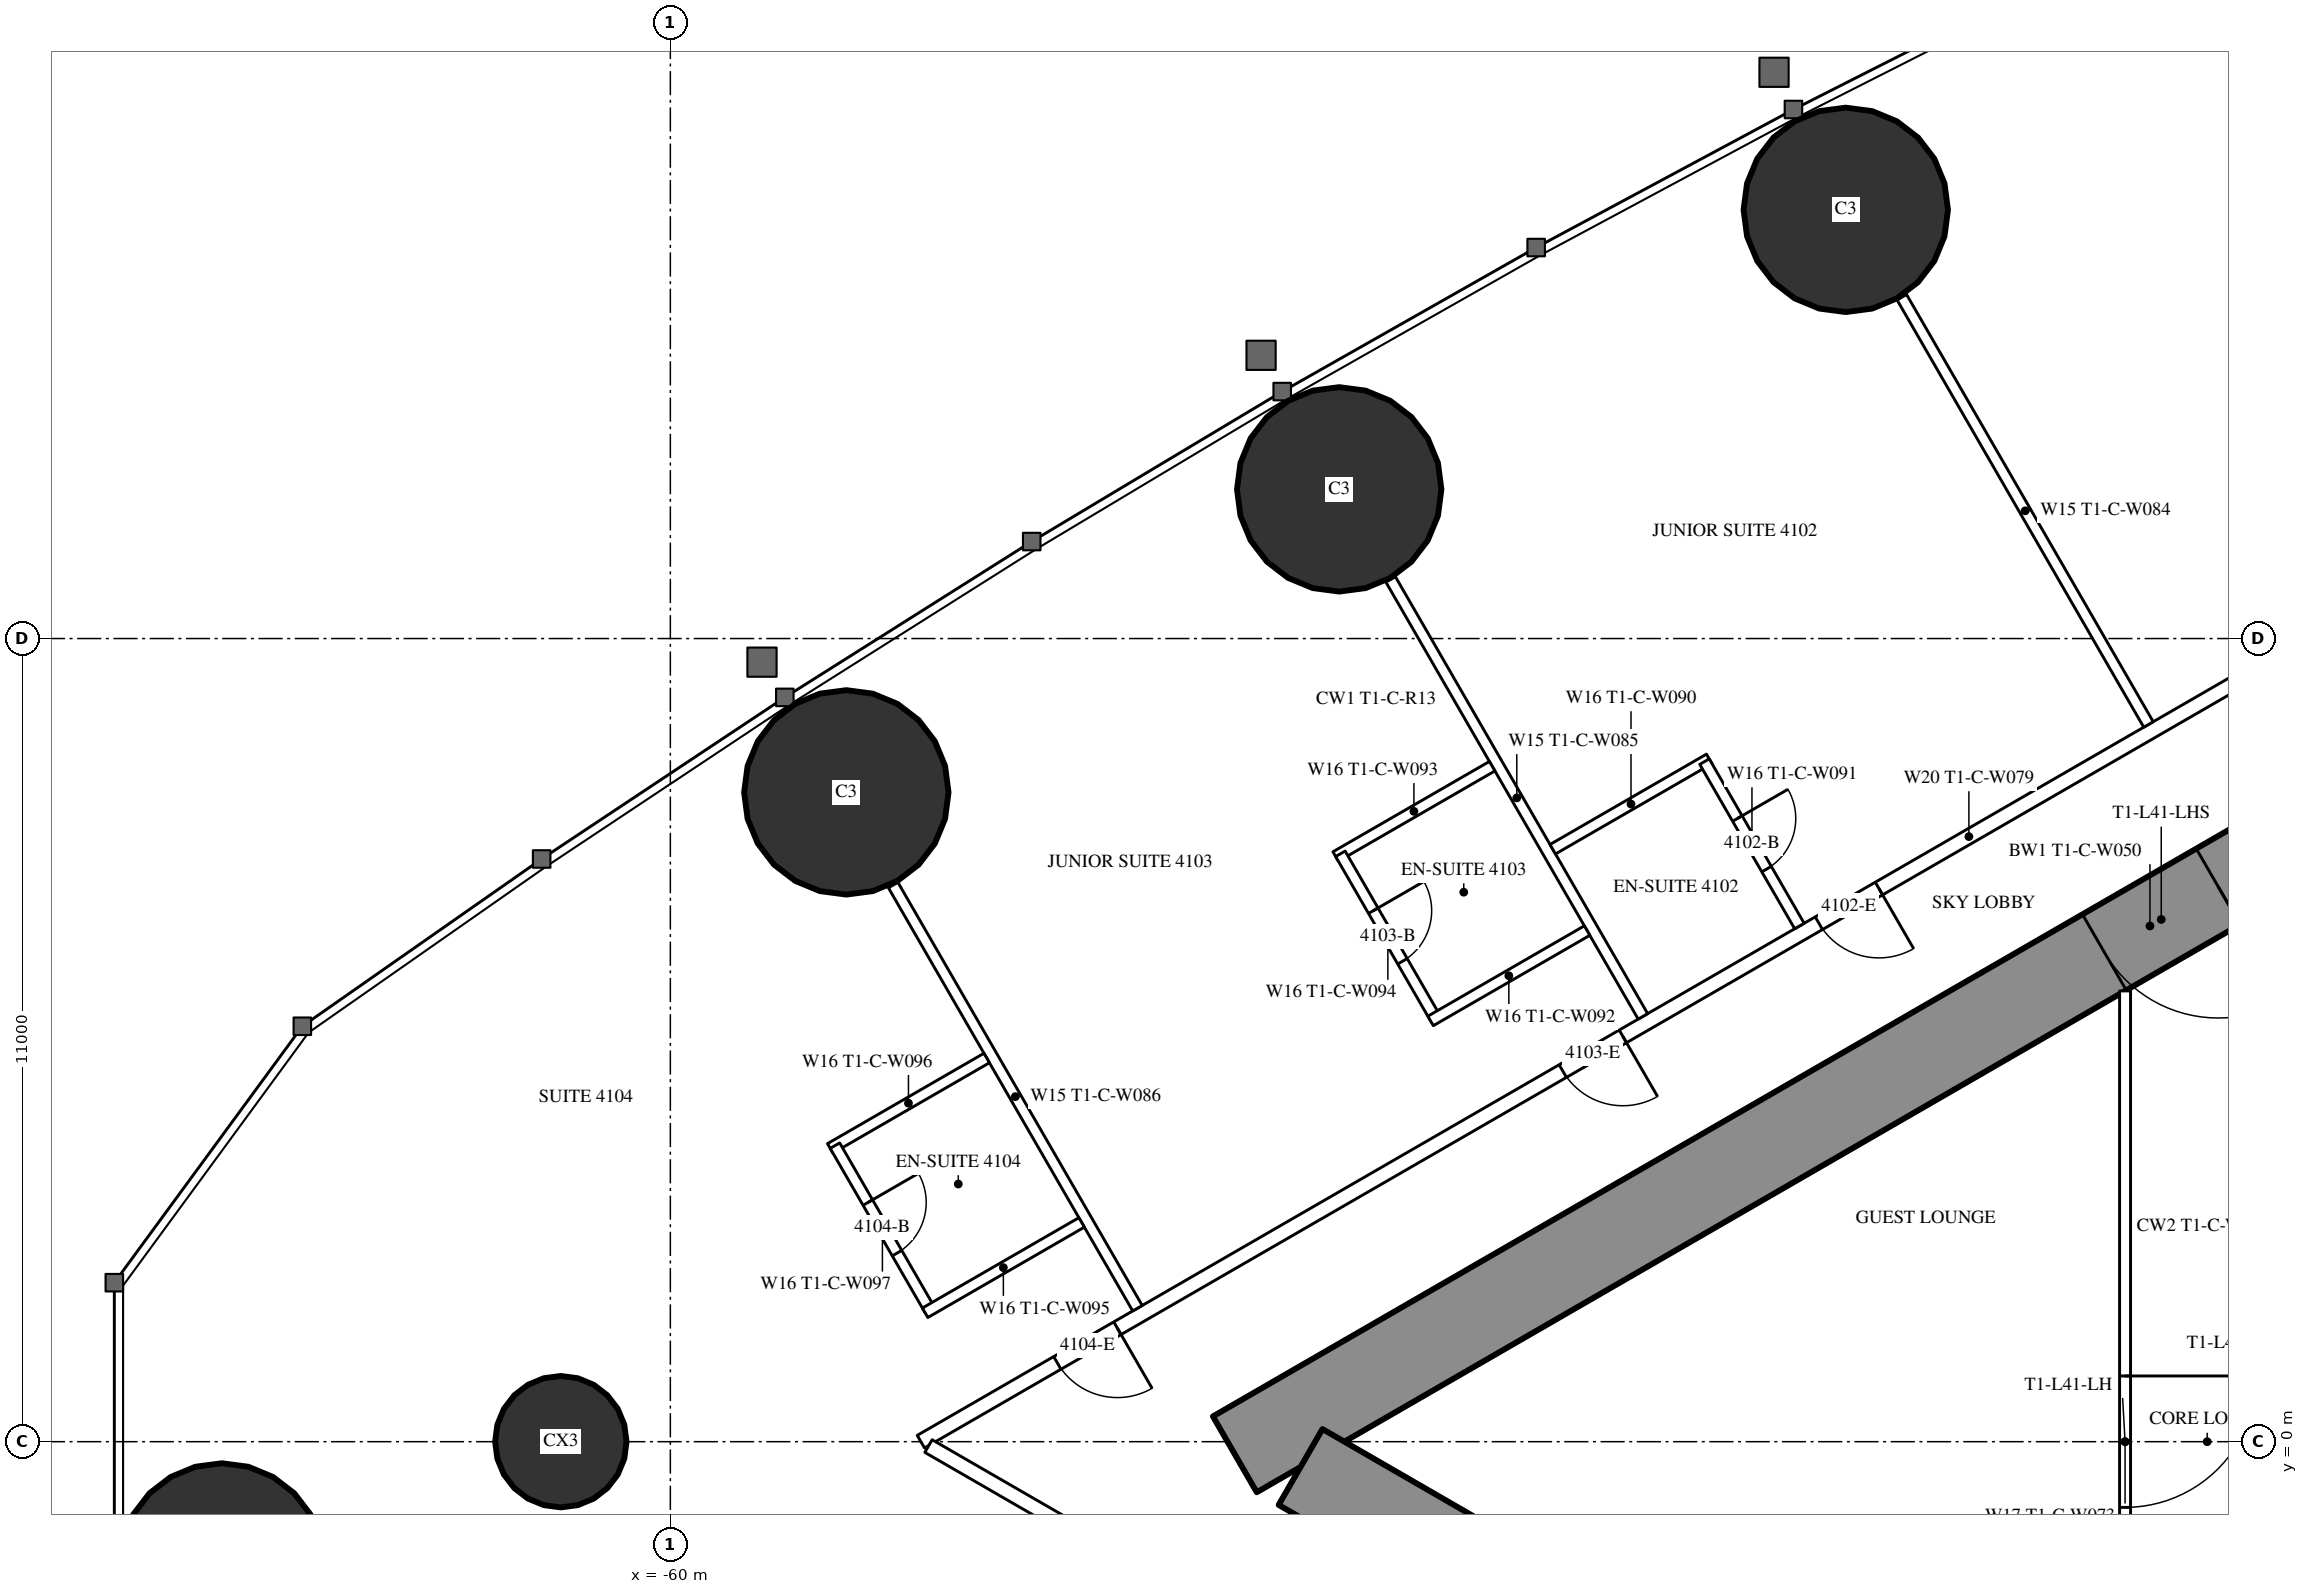
"""IFC4 building model, lengths in metres.
Left out: names, types, materials, properties, quantities, classifications, styles, units other than length and angle.
Written with IfcOpenShell. Run it as: python <this file> out.ifc"""

import sys

from ifc_helpers import new_model, si_unit, direction, frame, frame_2d, origin, origin_2d, place, context, subcontext, project, spatial, rectangle, circle, extrude, element, fill, save


model = new_model("IFC4")
c1 = context("Model", 3, precision=1e-05, world=origin(), true_north=direction((0.0, 1.0)))
c2 = subcontext(c1, "Body", "Model", "MODEL_VIEW")
j1 = project(units=[si_unit("LENGTHUNIT", "METRE"), si_unit("PLANEANGLEUNIT", "RADIAN")], contexts=[c1])
p1 = place(None, origin())
s1 = spatial("IfcSite", under=j1, at=p1, CompositionType="ELEMENT")
p2 = place(p1, origin())
s2 = spatial("IfcBuilding", under=s1, at=p2, CompositionType="ELEMENT")
p3 = place(p2, frame((0.0, 0.0, 156.3)))
s3 = spatial("IfcBuildingStorey", under=s2, at=p3, CompositionType="ELEMENT", Elevation=156.3)
for number, where, z_axis, x_axis in (
    (1, (-66.143, -1.695, 0.0), (0.0, 0.0, 1.0), (1.0, 0.0, 0.0)),
    (2, (-43.9, 16.871, 0.0), (0.0, 0.0, 1.0), (1.0, 0.0, 0.0)),
    (3, (-50.839, 13.043, 0.0), (0.0, 0.0, 1.0), (1.0, 0.0, 0.0)),
    (4, (-57.59, 8.893, 0.0), (0.0, 0.0, 1.0), (1.0, 0.0, 0.0)),
):
    element("IfcColumn", number, at=place(p3, frame(where, z_axis=z_axis, x_axis=x_axis)), inside=s3, PredefinedType="COLUMN", context=c2, shape_type="SweptSolid", body=[
        extrude(circle(Radius=1.4, at=origin_2d()), origin(), (0.0, 0.0, 1.0), 3.5),
    ])
p4 = place(p3, frame((-61.5, 0.0, 0.0), z_axis=(0.0, 0.0, 1.0), x_axis=(1.0, 0.0, 0.0)))
e5 = element("IfcColumn", 5, at=p4, inside=s3, PredefinedType="COLUMN", context=c2, shape_type="SweptSolid", body=[
    extrude(circle(Radius=0.9, at=origin_2d()), origin(), (0.0, 0.0, 1.0), 3.5),
])
p5 = place(p3, frame((-27.2, 14.3, 0.0), z_axis=(0.0, 0.0, 1.0), x_axis=(-0.866026593062, -0.499997940104, 0.0)))
e6 = element("IfcWall", 6, at=p5, inside=s3, PredefinedType="SHEAR", context=c2, shape_type="SweptSolid", body=[
    extrude(rectangle(XDim=28.946, YDim=1.2, at=frame_2d((14.473, 0.0))), origin(), (0.0, 0.0, 1.0), 3.5),
])
p6 = place(p5, frame((4.6, 0.0, 0.0)))
e7 = element("IfcOpeningElement", 7, at=p6, cuts=e6, PredefinedType="OPENING", context=c2, shape_type="SweptSolid", body=[
    extrude(rectangle(XDim=1.0, YDim=2.2, at=frame_2d((0.5, 1.1))), frame((0.0, 0.61, 0.0), z_axis=(0.0, -1.0, 0.0), x_axis=(1.0, 0.0, 0.0)), (0.0, 0.0, 1.0), 1.22),
])
p7 = place(p5, frame((13.395, 0.0, 0.0)))
e8 = element("IfcOpeningElement", 8, at=p7, cuts=e6, PredefinedType="OPENING", context=c2, shape_type="SweptSolid", body=[
    extrude(rectangle(XDim=1.8, YDim=2.2, at=frame_2d((0.9, 1.1))), frame((0.0, 0.61, 0.0), z_axis=(0.0, -1.0, 0.0), x_axis=(1.0, 0.0, 0.0)), (0.0, 0.0, 1.0), 1.22),
])
p8 = place(p3, frame((-27.2, -14.3, 0.0), z_axis=(0.0, 0.0, 1.0), x_axis=(-0.866024021859, 0.500002393557, 0.0)))
e9 = element("IfcWall", 9, at=p8, inside=s3, PredefinedType="SHEAR", context=c2, shape_type="SweptSolid", body=[
    extrude(rectangle(XDim=27.907, YDim=1.2, at=frame_2d((13.954, 0.0))), origin(), (0.0, 0.0, 1.0), 3.5),
])
p9 = place(p8, frame((4.6, 0.0, 0.0)))
e10 = element("IfcOpeningElement", 10, at=p9, cuts=e9, PredefinedType="OPENING", context=c2, shape_type="SweptSolid", body=[
    extrude(rectangle(XDim=1.0, YDim=2.2, at=frame_2d((0.5, 1.1))), frame((0.0, 0.61, 0.0), z_axis=(0.0, -1.0, 0.0), x_axis=(1.0, 0.0, 0.0)), (0.0, 0.0, 1.0), 1.22),
])
p10 = place(p8, frame((13.395, 0.0, 0.0)))
e11 = element("IfcOpeningElement", 11, at=p10, cuts=e9, PredefinedType="OPENING", context=c2, shape_type="SweptSolid", body=[
    extrude(rectangle(XDim=1.8, YDim=2.2, at=frame_2d((0.9, 1.1))), frame((0.0, 0.61, 0.0), z_axis=(0.0, -1.0, 0.0), x_axis=(1.0, 0.0, 0.0)), (0.0, 0.0, 1.0), 1.22),
])
p11 = place(p3, frame((-27.86, 16.575, 0.0), z_axis=(0.0, 0.0, 1.0), x_axis=(-0.866025533911, -0.499999774615, 0.0)))
e12 = element("IfcWall", 12, at=p11, inside=s3, PredefinedType="PARTITIONING", context=c2, shape_type="SweptSolid", body=[
    extrude(rectangle(XDim=33.149, YDim=0.2, at=frame_2d((16.575, 0.0))), origin(), (0.0, 0.0, 1.0), 3.25),
])
p12 = place(p11, frame((3.75, 0.0, 0.0)))
e13 = element("IfcOpeningElement", 13, at=p12, cuts=e12, PredefinedType="OPENING", context=c2, shape_type="SweptSolid", body=[
    extrude(rectangle(XDim=1.0, YDim=2.2, at=frame_2d((0.5, 1.1))), frame((0.0, 0.11, 0.0), z_axis=(0.0, -1.0, 0.0), x_axis=(1.0, 0.0, 0.0)), (0.0, 0.0, 1.0), 0.22),
])
p13 = place(p11, frame((17.997, 0.0, 0.0)))
e14 = element("IfcOpeningElement", 14, at=p13, cuts=e12, PredefinedType="OPENING", context=c2, shape_type="SweptSolid", body=[
    extrude(rectangle(XDim=0.95, YDim=2.2, at=frame_2d((0.475, 1.1))), frame((0.0, 0.11, 0.0), z_axis=(0.0, -1.0, 0.0), x_axis=(1.0, 0.0, 0.0)), (0.0, 0.0, 1.0), 0.22),
])
p14 = place(p11, frame((22.047, 0.0, 0.0)))
e15 = element("IfcOpeningElement", 15, at=p14, cuts=e12, PredefinedType="OPENING", context=c2, shape_type="SweptSolid", body=[
    extrude(rectangle(XDim=0.95, YDim=2.2, at=frame_2d((0.475, 1.1))), frame((0.0, 0.11, 0.0), z_axis=(0.0, -1.0, 0.0), x_axis=(1.0, 0.0, 0.0)), (0.0, 0.0, 1.0), 0.22),
])
p15 = place(p11, frame((30.042, 0.0, 0.0)))
e16 = element("IfcOpeningElement", 16, at=p15, cuts=e12, PredefinedType="OPENING", context=c2, shape_type="SweptSolid", body=[
    extrude(rectangle(XDim=0.95, YDim=2.2, at=frame_2d((0.475, 1.1))), frame((0.0, 0.11, 0.0), z_axis=(0.0, -1.0, 0.0), x_axis=(1.0, 0.0, 0.0)), (0.0, 0.0, 1.0), 0.22),
])
p16 = place(p3, frame((-39.754, 9.823, 0.0), z_axis=(0.0, 0.0, 1.0), x_axis=(-0.499997670926, 0.866026748472, 0.0)))
e17 = element("IfcWall", 17, at=p16, inside=s3, PredefinedType="PARTITIONING", context=c2, shape_type="SweptSolid", body=[
    extrude(rectangle(XDim=6.757, YDim=0.15, at=frame_2d((3.379, 0.0))), origin(), (0.0, 0.0, 1.0), 2.3),
])
p17 = place(p3, frame((-46.679, 5.825, 0.0), z_axis=(0.0, 0.0, 1.0), x_axis=(-0.500006839597, 0.866021454905, 0.0)))
e18 = element("IfcWall", 18, at=p17, inside=s3, PredefinedType="PARTITIONING", context=c2, shape_type="SweptSolid", body=[
    extrude(rectangle(XDim=6.911, YDim=0.15, at=frame_2d((3.456, 0.0))), origin(), (0.0, 0.0, 1.0), 2.3),
])
p18 = place(p3, frame((-53.602, 1.828, 0.0), z_axis=(0.0, 0.0, 1.0), x_axis=(-0.49999191814, 0.866030069798, 0.0)))
e19 = element("IfcWall", 19, at=p18, inside=s3, PredefinedType="PARTITIONING", context=c2, shape_type="SweptSolid", body=[
    extrude(rectangle(XDim=6.692, YDim=0.15, at=frame_2d((3.346, 0.0))), origin(), (0.0, 0.0, 1.0), 2.3),
])
p19 = place(p3, frame((-44.715, -6.844, 0.0), z_axis=(0.0, 0.0, 1.0), x_axis=(-0.866025261224, 0.500000246922, 0.0)))
e20 = element("IfcWall", 20, at=p19, inside=s3, PredefinedType="PARTITIONING", context=c2, shape_type="SweptSolid", body=[
    extrude(rectangle(XDim=13.567, YDim=0.2, at=frame_2d((6.783, 0.0))), origin(), (0.0, 0.0, 1.0), 3.25),
])
p20 = place(p19, frame((10.579, 0.0, 0.0)))
e21 = element("IfcOpeningElement", 21, at=p20, cuts=e20, PredefinedType="OPENING", context=c2, shape_type="SweptSolid", body=[
    extrude(rectangle(XDim=0.95, YDim=2.2, at=frame_2d((0.475, 1.1))), frame((0.0, 0.11, 0.0), z_axis=(0.0, -1.0, 0.0), x_axis=(1.0, 0.0, 0.0)), (0.0, 0.0, 1.0), 0.22),
])
p21 = place(p19, frame((6.529, 0.0, 0.0)))
e22 = element("IfcOpeningElement", 22, at=p21, cuts=e20, PredefinedType="OPENING", context=c2, shape_type="SweptSolid", body=[
    extrude(rectangle(XDim=0.95, YDim=2.2, at=frame_2d((0.475, 1.1))), frame((0.0, 0.11, 0.0), z_axis=(0.0, -1.0, 0.0), x_axis=(1.0, 0.0, 0.0)), (0.0, 0.0, 1.0), 0.22),
])
p22 = place(p19, frame((0.5, 0.0, 0.0)))
e23 = element("IfcOpeningElement", 23, at=p22, cuts=e20, PredefinedType="OPENING", context=c2, shape_type="SweptSolid", body=[
    extrude(rectangle(XDim=1.435, YDim=2.2, at=frame_2d((0.718, 1.1))), frame((0.0, 0.11, 0.0), z_axis=(0.0, -1.0, 0.0), x_axis=(1.0, 0.0, 0.0)), (0.0, 0.0, 1.0), 0.22),
])
p23 = place(p3, frame((-45.771, 9.352, 0.0), z_axis=(0.0, 0.0, 1.0), x_axis=(-0.866006523861, -0.500032699561, 0.0)))
e24 = element("IfcWall", 24, at=p23, inside=s3, PredefinedType="PARTITIONING", context=c2, shape_type="SweptSolid", body=[
    extrude(rectangle(XDim=2.475, YDim=0.15, at=frame_2d((1.237, 0.0))), origin(), (0.0, 0.0, 1.0), 3.25),
])
p24 = place(p3, frame((-44.535, 7.063, 0.0), z_axis=(0.0, 0.0, 1.0), x_axis=(-0.500047596559, 0.865997922154, 0.0)))
e25 = element("IfcWall", 25, at=p24, inside=s3, PredefinedType="PARTITIONING", context=c2, shape_type="SweptSolid", body=[
    extrude(rectangle(XDim=2.6, YDim=0.15, at=frame_2d((1.3, 0.0))), origin(), (0.0, 0.0, 1.0), 3.25),
])
p25 = place(p24, frame((0.9, 0.0, 0.0)))
e26 = element("IfcOpeningElement", 26, at=p25, cuts=e25, PredefinedType="OPENING", context=c2, shape_type="SweptSolid", body=[
    extrude(rectangle(XDim=0.8, YDim=2.2, at=frame_2d((0.4, 1.1))), frame((0.0, 0.085, 0.0), z_axis=(0.0, -1.0, 0.0), x_axis=(1.0, 0.0, 0.0)), (0.0, 0.0, 1.0), 0.17),
])
p26 = place(p3, frame((-48.744, 9.252, 0.0), z_axis=(0.0, 0.0, 1.0), x_axis=(-0.866006523861, -0.500032699561, 0.0)))
e27 = element("IfcWall", 27, at=p26, inside=s3, PredefinedType="PARTITIONING", context=c2, shape_type="SweptSolid", body=[
    extrude(rectangle(XDim=2.475, YDim=0.15, at=frame_2d((1.237, 0.0))), origin(), (0.0, 0.0, 1.0), 3.25),
])
p27 = place(p3, frame((-49.522, 5.8, 0.0), z_axis=(0.0, 0.0, 1.0), x_axis=(-0.500006934395, 0.866021400173, 0.0)))
e28 = element("IfcWall", 28, at=p27, inside=s3, PredefinedType="PARTITIONING", context=c2, shape_type="SweptSolid", body=[
    extrude(rectangle(XDim=2.6, YDim=0.15, at=frame_2d((1.3, 0.0))), origin(), (0.0, 0.0, 1.0), 3.25),
])
p28 = place(p27, frame((0.9, 0.0, 0.0)))
e29 = element("IfcOpeningElement", 29, at=p28, cuts=e28, PredefinedType="OPENING", context=c2, shape_type="SweptSolid", body=[
    extrude(rectangle(XDim=0.8, YDim=2.2, at=frame_2d((0.4, 1.1))), frame((0.0, 0.085, 0.0), z_axis=(0.0, -1.0, 0.0), x_axis=(1.0, 0.0, 0.0)), (0.0, 0.0, 1.0), 0.17),
])
for number, where, z_axis, x_axis in (
    (30, (-47.444, 7.0, 0.0), (0.0, 0.0, 1.0), (-0.866, -0.5, 0.0)),
    (31, (-55.667, 5.255, 0.0), (0.0, 0.0, 1.0), (-0.866, -0.5, 0.0)),
):
    element("IfcWall", number, at=place(p3, frame(where, z_axis=z_axis, x_axis=x_axis)), inside=s3, PredefinedType="PARTITIONING", context=c2, shape_type="SweptSolid", body=[
        extrude(rectangle(XDim=2.475, YDim=0.15, at=frame_2d((1.237, 0.0))), origin(), (0.0, 0.0, 1.0), 3.25),
    ])
p29 = place(p3, frame((-56.446, 1.803, 0.0), z_axis=(0.0, 0.0, 1.0), x_axis=(-0.499936506574, 0.866062058628, 0.0)))
e32 = element("IfcWall", 32, at=p29, inside=s3, PredefinedType="PARTITIONING", context=c2, shape_type="SweptSolid", body=[
    extrude(rectangle(XDim=2.6, YDim=0.15, at=frame_2d((1.3, 0.0))), origin(), (0.0, 0.0, 1.0), 3.25),
])
p30 = place(p29, frame((0.9, 0.0, 0.0)))
e33 = element("IfcOpeningElement", 33, at=p30, cuts=e32, PredefinedType="OPENING", context=c2, shape_type="SweptSolid", body=[
    extrude(rectangle(XDim=0.8, YDim=2.2, at=frame_2d((0.4, 1.1))), frame((0.0, 0.085, 0.0), z_axis=(0.0, -1.0, 0.0), x_axis=(1.0, 0.0, 0.0)), (0.0, 0.0, 1.0), 0.17),
])
p31 = place(p3, frame((-54.367, 3.003, 0.0), z_axis=(0.0, 0.0, 1.0), x_axis=(-0.866031185235, -0.4999899861, 0.0)))
e34 = element("IfcWall", 34, at=p31, inside=s3, PredefinedType="PARTITIONING", context=c2, shape_type="SweptSolid", body=[
    extrude(rectangle(XDim=2.475, YDim=0.15, at=frame_2d((1.238, 0.0))), origin(), (0.0, 0.0, 1.0), 3.25),
])
p32 = place(p3, frame((-40.075, 6.174, 0.0), z_axis=(0.0, 0.0, 1.0), x_axis=(0.0, -1.0, 0.0)))
e35 = element("IfcWall", 35, at=p32, inside=s3, PredefinedType="PARTITIONING", context=c2, shape_type="SweptSolid", body=[
    extrude(rectangle(XDim=12.348, YDim=0.15, at=frame_2d((6.174, 0.0))), origin(), (0.0, 0.0, 1.0), 3.25),
])
p33 = place(p32, frame((5.274, 0.0, 0.0)))
e36 = element("IfcOpeningElement", 36, at=p33, cuts=e35, PredefinedType="OPENING", context=c2, shape_type="SweptSolid", body=[
    extrude(rectangle(XDim=1.8, YDim=2.2, at=frame_2d((0.9, 1.1))), frame((0.0, 0.085, 0.0), z_axis=(0.0, -1.0, 0.0), x_axis=(1.0, 0.0, 0.0)), (0.0, 0.0, 1.0), 0.17),
])
p34 = place(p25, origin())
e37 = element("IfcDoor", 37, at=p34, inside=s3, OperationType="SINGLE_SWING_RIGHT", PredefinedType="DOOR", context=c2, shape_type="SweptSolid", body=[
    extrude(rectangle(XDim=0.8, YDim=2.2, at=frame_2d((0.4, 1.1))), frame((0.0, 0.025, 0.0), z_axis=(0.0, -1.0, 0.0), x_axis=(1.0, 0.0, 0.0)), (0.0, 0.0, 1.0), 0.05),
])
fill(e26, e37)
p35 = place(p13, origin())
e38 = element("IfcDoor", 38, at=p35, inside=s3, OperationType="SINGLE_SWING_LEFT", PredefinedType="DOOR", context=c2, shape_type="SweptSolid", body=[
    extrude(rectangle(XDim=0.95, YDim=2.2, at=frame_2d((0.475, 1.1))), frame((0.0, 0.025, 0.0), z_axis=(0.0, -1.0, 0.0), x_axis=(1.0, 0.0, 0.0)), (0.0, 0.0, 1.0), 0.05),
])
fill(e14, e38)
p36 = place(p28, origin())
e39 = element("IfcDoor", 39, at=p36, inside=s3, OperationType="SINGLE_SWING_RIGHT", PredefinedType="DOOR", context=c2, shape_type="SweptSolid", body=[
    extrude(rectangle(XDim=0.8, YDim=2.2, at=frame_2d((0.4, 1.1))), frame((0.0, 0.025, 0.0), z_axis=(0.0, -1.0, 0.0), x_axis=(1.0, 0.0, 0.0)), (0.0, 0.0, 1.0), 0.05),
])
fill(e29, e39)
p37 = place(p14, origin())
e40 = element("IfcDoor", 40, at=p37, inside=s3, OperationType="SINGLE_SWING_LEFT", PredefinedType="DOOR", context=c2, shape_type="SweptSolid", body=[
    extrude(rectangle(XDim=0.95, YDim=2.2, at=frame_2d((0.475, 1.1))), frame((0.0, 0.025, 0.0), z_axis=(0.0, -1.0, 0.0), x_axis=(1.0, 0.0, 0.0)), (0.0, 0.0, 1.0), 0.05),
])
fill(e15, e40)
p38 = place(p30, origin())
e41 = element("IfcDoor", 41, at=p38, inside=s3, OperationType="SINGLE_SWING_RIGHT", PredefinedType="DOOR", context=c2, shape_type="SweptSolid", body=[
    extrude(rectangle(XDim=0.8, YDim=2.2, at=frame_2d((0.4, 1.1))), frame((0.0, 0.025, 0.0), z_axis=(0.0, -1.0, 0.0), x_axis=(1.0, 0.0, 0.0)), (0.0, 0.0, 1.0), 0.05),
])
fill(e33, e41)
p39 = place(p15, origin())
e42 = element("IfcDoor", 42, at=p39, inside=s3, OperationType="SINGLE_SWING_LEFT", PredefinedType="DOOR", context=c2, shape_type="SweptSolid", body=[
    extrude(rectangle(XDim=0.95, YDim=2.2, at=frame_2d((0.475, 1.1))), frame((0.0, 0.025, 0.0), z_axis=(0.0, -1.0, 0.0), x_axis=(1.0, 0.0, 0.0)), (0.0, 0.0, 1.0), 0.05),
])
fill(e16, e42)
p40 = place(p33, origin())
e43 = element("IfcDoor", 43, at=p40, inside=s3, OperationType="DOUBLE_DOOR_SINGLE_SWING", PredefinedType="DOOR", context=c2, shape_type="SweptSolid", body=[
    extrude(rectangle(XDim=1.8, YDim=2.2, at=frame_2d((0.9, 1.1))), frame((0.0, 0.025, 0.0), z_axis=(0.0, -1.0, 0.0), x_axis=(1.0, 0.0, 0.0)), (0.0, 0.0, 1.0), 0.05),
])
fill(e36, e43)
p41 = place(p7, origin())
e44 = element("IfcDoor", 44, at=p41, inside=s3, OperationType="DOUBLE_DOOR_SINGLE_SWING", PredefinedType="DOOR", context=c2, shape_type="SweptSolid", body=[
    extrude(rectangle(XDim=1.8, YDim=2.2, at=frame_2d((0.9, 1.1))), frame((0.0, 0.025, 0.0), z_axis=(0.0, -1.0, 0.0), x_axis=(1.0, 0.0, 0.0)), (0.0, 0.0, 1.0), 0.05),
])
fill(e8, e44)
save(model, sys.argv[1])
